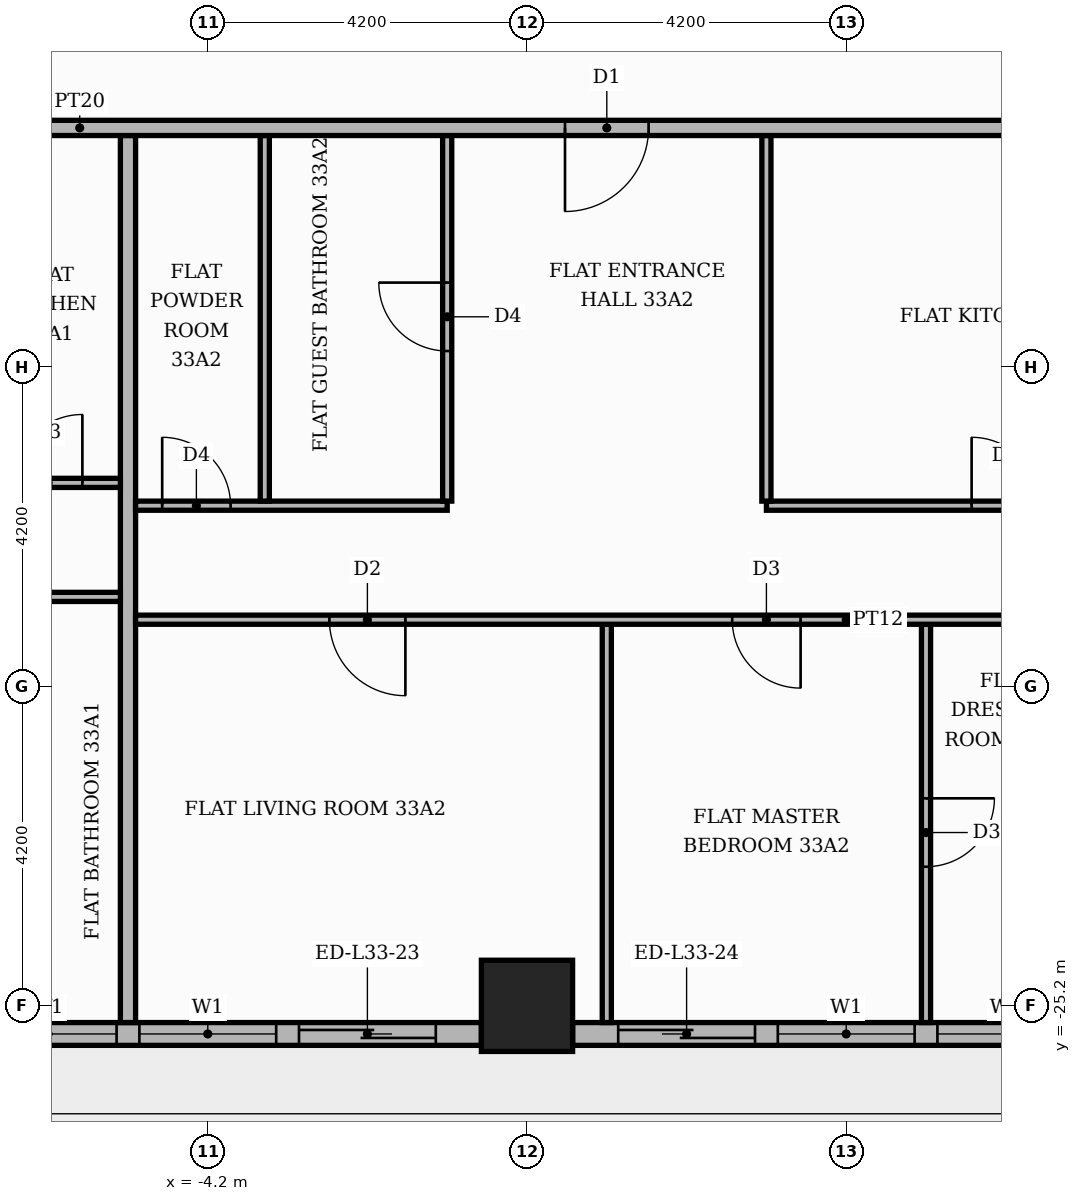
"""IFC4 building model, lengths in metres.
Left out: names, types, materials, properties, quantities, classifications, styles, units other than length and angle.
Written with IfcOpenShell. Run it as: python <this file> out.ifc"""

import sys

from ifc_helpers import new_model, si_unit, direction, frame, frame_2d, origin, origin_2d, place, context, subcontext, project, spatial, rectangle, extrude, element, fill, save


model = new_model("IFC4")
c1 = context("Model", 3, precision=1e-05, world=origin(), true_north=direction((0.0, 1.0)))
c2 = subcontext(c1, "Body", "Model", "MODEL_VIEW")
j1 = project(units=[si_unit("LENGTHUNIT", "METRE"), si_unit("PLANEANGLEUNIT", "RADIAN")], contexts=[c1])
p1 = place(None, origin())
s1 = spatial("IfcSite", under=j1, at=p1, CompositionType="ELEMENT")
p2 = place(p1, origin())
s2 = spatial("IfcBuilding", under=s1, at=p2, CompositionType="ELEMENT")
p3 = place(p2, frame((0.0, 0.0, 141.6)))
s3 = spatial("IfcBuildingStorey", under=s2, at=p3, CompositionType="ELEMENT", Elevation=141.6)
p4 = place(p3, frame((0.0, -25.2, 0.0), z_axis=(0.0, 0.0, 1.0), x_axis=(1.0, 0.0, 0.0)))
e1 = element("IfcColumn", 1, at=p4, inside=s3, PredefinedType="COLUMN", context=c2, shape_type="SweptSolid", body=[
    extrude(rectangle(XDim=1.2, YDim=1.2, at=origin_2d()), origin(), (0.0, 0.0, 1.0), 3.9),
])
p5 = place(p3, frame((-7.8, -25.57, 0.0), z_axis=(0.0, 0.0, 1.0), x_axis=(1.0, 0.0, 0.0)))
e2 = element("IfcWall", 2, at=p5, inside=s3, PredefinedType="STANDARD", context=c2, shape_type="SweptSolid", body=[
    extrude(rectangle(XDim=7.2, YDim=0.3, at=frame_2d((3.6, 0.0))), origin(), (0.0, 0.0, 1.0), 3.48),
])
p6 = place(p5, frame((0.6, 0.0, 0.9)))
e3 = element("IfcOpeningElement", 3, at=p6, cuts=e2, PredefinedType="OPENING", context=c2, shape_type="SweptSolid", body=[
    extrude(rectangle(XDim=1.8, YDim=2.1, at=frame_2d((0.9, 1.05))), frame((0.0, 0.16, 0.0), z_axis=(0.0, -1.0, 0.0), x_axis=(1.0, 0.0, 0.0)), (0.0, 0.0, 1.0), 0.32),
])
p7 = place(p5, frame((2.7, 0.0, 0.9)))
e4 = element("IfcOpeningElement", 4, at=p7, cuts=e2, PredefinedType="OPENING", context=c2, shape_type="SweptSolid", body=[
    extrude(rectangle(XDim=1.8, YDim=2.1, at=frame_2d((0.9, 1.05))), frame((0.0, 0.16, 0.0), z_axis=(0.0, -1.0, 0.0), x_axis=(1.0, 0.0, 0.0)), (0.0, 0.0, 1.0), 0.32),
])
p8 = place(p5, frame((4.8, 0.0, 0.0)))
e5 = element("IfcOpeningElement", 5, at=p8, cuts=e2, PredefinedType="OPENING", context=c2, shape_type="SweptSolid", body=[
    extrude(rectangle(XDim=1.8, YDim=2.4, at=frame_2d((0.9, 1.2))), frame((0.0, 0.16, 0.0), z_axis=(0.0, -1.0, 0.0), x_axis=(1.0, 0.0, 0.0)), (0.0, 0.0, 1.0), 0.32),
])
p9 = place(p3, frame((0.6, -25.57, 0.0), z_axis=(0.0, 0.0, 1.0), x_axis=(1.0, 0.0, 0.0)))
e6 = element("IfcWall", 6, at=p9, inside=s3, PredefinedType="STANDARD", context=c2, shape_type="SweptSolid", body=[
    extrude(rectangle(XDim=7.2, YDim=0.3, at=frame_2d((3.6, 0.0))), origin(), (0.0, 0.0, 1.0), 3.48),
])
p10 = place(p9, frame((0.6, 0.0, 0.0)))
e7 = element("IfcOpeningElement", 7, at=p10, cuts=e6, PredefinedType="OPENING", context=c2, shape_type="SweptSolid", body=[
    extrude(rectangle(XDim=1.8, YDim=2.4, at=frame_2d((0.9, 1.2))), frame((0.0, 0.16, 0.0), z_axis=(0.0, -1.0, 0.0), x_axis=(1.0, 0.0, 0.0)), (0.0, 0.0, 1.0), 0.32),
])
p11 = place(p9, frame((2.7, 0.0, 0.9)))
e8 = element("IfcOpeningElement", 8, at=p11, cuts=e6, PredefinedType="OPENING", context=c2, shape_type="SweptSolid", body=[
    extrude(rectangle(XDim=1.8, YDim=2.1, at=frame_2d((0.9, 1.05))), frame((0.0, 0.16, 0.0), z_axis=(0.0, -1.0, 0.0), x_axis=(1.0, 0.0, 0.0)), (0.0, 0.0, 1.0), 0.32),
])
p12 = place(p9, frame((4.8, 0.0, 0.9)))
e9 = element("IfcOpeningElement", 9, at=p12, cuts=e6, PredefinedType="OPENING", context=c2, shape_type="SweptSolid", body=[
    extrude(rectangle(XDim=1.8, YDim=2.1, at=frame_2d((0.9, 1.05))), frame((0.0, 0.16, 0.0), z_axis=(0.0, -1.0, 0.0), x_axis=(1.0, 0.0, 0.0)), (0.0, 0.0, 1.0), 0.32),
])
p13 = place(p3, frame((-5.25, -25.42, 0.0), z_axis=(0.0, 0.0, 1.0), x_axis=(0.0, 1.0, 0.0)))
e10 = element("IfcWall", 10, at=p13, inside=s3, PredefinedType="PARTITIONING", context=c2, shape_type="SweptSolid", body=[
    extrude(rectangle(XDim=11.67, YDim=0.2, at=frame_2d((5.835, 0.0))), origin(), (0.0, 0.0, 1.0), 3.48),
])
p14 = place(p3, frame((1.05, -25.42, 0.0), z_axis=(0.0, 0.0, 1.0), x_axis=(0.0, 1.0, 0.0)))
e11 = element("IfcWall", 11, at=p14, inside=s3, PredefinedType="PARTITIONING", context=c2, shape_type="SweptSolid", body=[
    extrude(rectangle(XDim=5.24, YDim=0.12, at=frame_2d((2.62, 0.0))), origin(), (0.0, 0.0, 1.0), 3.48),
])
p15 = place(p3, frame((5.25, -25.42, 0.0), z_axis=(0.0, 0.0, 1.0), x_axis=(0.0, 1.0, 0.0)))
e12 = element("IfcWall", 12, at=p15, inside=s3, PredefinedType="PARTITIONING", context=c2, shape_type="SweptSolid", body=[
    extrude(rectangle(XDim=5.24, YDim=0.12, at=frame_2d((2.62, 0.0))), origin(), (0.0, 0.0, 1.0), 3.48),
])
p16 = place(p15, frame((2.05, 0.0, 0.0)))
e13 = element("IfcOpeningElement", 13, at=p16, cuts=e12, PredefinedType="OPENING", context=c2, shape_type="SweptSolid", body=[
    extrude(rectangle(XDim=0.9, YDim=2.1, at=frame_2d((0.45, 1.05))), frame((0.0, 0.07, 0.0), z_axis=(0.0, -1.0, 0.0), x_axis=(1.0, 0.0, 0.0)), (0.0, 0.0, 1.0), 0.14),
])
p17 = place(p3, frame((-5.15, -20.12, 0.0), z_axis=(0.0, 0.0, 1.0), x_axis=(1.0, 0.0, 0.0)))
e14 = element("IfcWall", 14, at=p17, inside=s3, PredefinedType="PARTITIONING", context=c2, shape_type="SweptSolid", body=[
    extrude(rectangle(XDim=18.7, YDim=0.12, at=frame_2d((9.35, 0.0))), origin(), (0.0, 0.0, 1.0), 3.48),
])
p18 = place(p17, frame((2.55, 0.0, 0.0)))
e15 = element("IfcOpeningElement", 15, at=p18, cuts=e14, PredefinedType="OPENING", context=c2, shape_type="SweptSolid", body=[
    extrude(rectangle(XDim=1.0, YDim=2.1, at=frame_2d((0.5, 1.05))), frame((0.0, 0.07, 0.0), z_axis=(0.0, -1.0, 0.0), x_axis=(1.0, 0.0, 0.0)), (0.0, 0.0, 1.0), 0.14),
])
p19 = place(p17, frame((7.85, 0.0, 0.0)))
e16 = element("IfcOpeningElement", 16, at=p19, cuts=e14, PredefinedType="OPENING", context=c2, shape_type="SweptSolid", body=[
    extrude(rectangle(XDim=0.9, YDim=2.1, at=frame_2d((0.45, 1.05))), frame((0.0, 0.07, 0.0), z_axis=(0.0, -1.0, 0.0), x_axis=(1.0, 0.0, 0.0)), (0.0, 0.0, 1.0), 0.14),
])
p20 = place(p17, frame((16.25, 0.0, 0.0)))
e17 = element("IfcOpeningElement", 17, at=p20, cuts=e14, PredefinedType="OPENING", context=c2, shape_type="SweptSolid", body=[
    extrude(rectangle(XDim=0.9, YDim=2.1, at=frame_2d((0.45, 1.05))), frame((0.0, 0.07, 0.0), z_axis=(0.0, -1.0, 0.0), x_axis=(1.0, 0.0, 0.0)), (0.0, 0.0, 1.0), 0.14),
])
p21 = place(p3, frame((-17.5, -19.82, 0.0), z_axis=(0.0, 0.0, 1.0), x_axis=(1.0, 0.0, 0.0)))
e18 = element("IfcWall", 18, at=p21, inside=s3, PredefinedType="PARTITIONING", context=c2, shape_type="SweptSolid", body=[
    extrude(rectangle(XDim=12.15, YDim=0.12, at=frame_2d((6.075, 0.0))), origin(), (0.0, 0.0, 1.0), 3.48),
])
p22 = place(p21, frame((2.3, 0.0, 0.0)))
e19 = element("IfcOpeningElement", 19, at=p22, cuts=e18, PredefinedType="OPENING", context=c2, shape_type="SweptSolid", body=[
    extrude(rectangle(XDim=1.0, YDim=2.1, at=frame_2d((0.5, 1.05))), frame((0.0, 0.07, 0.0), z_axis=(0.0, -1.0, 0.0), x_axis=(1.0, 0.0, 0.0)), (0.0, 0.0, 1.0), 0.14),
])
p23 = place(p21, frame((5.5, 0.0, 0.0)))
e20 = element("IfcOpeningElement", 20, at=p23, cuts=e18, PredefinedType="OPENING", context=c2, shape_type="SweptSolid", body=[
    extrude(rectangle(XDim=0.9, YDim=2.1, at=frame_2d((0.45, 1.05))), frame((0.0, 0.07, 0.0), z_axis=(0.0, -1.0, 0.0), x_axis=(1.0, 0.0, 0.0)), (0.0, 0.0, 1.0), 0.14),
])
p24 = place(p3, frame((-5.15, -18.62, 0.0), z_axis=(0.0, 0.0, 1.0), x_axis=(1.0, 0.0, 0.0)))
e21 = element("IfcWall", 21, at=p24, inside=s3, PredefinedType="PARTITIONING", context=c2, shape_type="SweptSolid", body=[
    extrude(rectangle(XDim=4.1, YDim=0.12, at=frame_2d((2.05, 0.0))), origin(), (0.0, 0.0, 1.0), 3.48),
])
p25 = place(p24, frame((0.35, 0.0, 0.0)))
e22 = element("IfcOpeningElement", 22, at=p25, cuts=e21, PredefinedType="OPENING", context=c2, shape_type="SweptSolid", body=[
    extrude(rectangle(XDim=0.9, YDim=2.1, at=frame_2d((0.45, 1.05))), frame((0.0, 0.07, 0.0), z_axis=(0.0, -1.0, 0.0), x_axis=(1.0, 0.0, 0.0)), (0.0, 0.0, 1.0), 0.14),
])
p26 = place(p3, frame((3.15, -18.62, 0.0), z_axis=(0.0, 0.0, 1.0), x_axis=(1.0, 0.0, 0.0)))
e23 = element("IfcWall", 23, at=p26, inside=s3, PredefinedType="PARTITIONING", context=c2, shape_type="SweptSolid", body=[
    extrude(rectangle(XDim=10.4, YDim=0.12, at=frame_2d((5.2, 0.0))), origin(), (0.0, 0.0, 1.0), 3.48),
])
p27 = place(p26, frame((2.7, 0.0, 0.0)))
e24 = element("IfcOpeningElement", 24, at=p27, cuts=e23, PredefinedType="OPENING", context=c2, shape_type="SweptSolid", body=[
    extrude(rectangle(XDim=0.9, YDim=2.1, at=frame_2d((0.45, 1.05))), frame((0.0, 0.07, 0.0), z_axis=(0.0, -1.0, 0.0), x_axis=(1.0, 0.0, 0.0)), (0.0, 0.0, 1.0), 0.14),
])
p28 = place(p26, frame((6.9, 0.0, 0.0)))
e25 = element("IfcOpeningElement", 25, at=p28, cuts=e23, PredefinedType="OPENING", context=c2, shape_type="SweptSolid", body=[
    extrude(rectangle(XDim=0.9, YDim=2.1, at=frame_2d((0.45, 1.05))), frame((0.0, 0.07, 0.0), z_axis=(0.0, -1.0, 0.0), x_axis=(1.0, 0.0, 0.0)), (0.0, 0.0, 1.0), 0.14),
])
p29 = place(p26, frame((9.0, 0.0, 0.0)))
e26 = element("IfcOpeningElement", 26, at=p29, cuts=e23, PredefinedType="OPENING", context=c2, shape_type="SweptSolid", body=[
    extrude(rectangle(XDim=0.9, YDim=2.1, at=frame_2d((0.45, 1.05))), frame((0.0, 0.07, 0.0), z_axis=(0.0, -1.0, 0.0), x_axis=(1.0, 0.0, 0.0)), (0.0, 0.0, 1.0), 0.14),
])
p30 = place(p3, frame((-3.45, -18.56, 0.0), z_axis=(0.0, 0.0, 1.0), x_axis=(0.0, 1.0, 0.0)))
e27 = element("IfcWall", 27, at=p30, inside=s3, PredefinedType="PARTITIONING", context=c2, shape_type="SweptSolid", body=[
    extrude(rectangle(XDim=4.81, YDim=0.12, at=frame_2d((2.405, 0.0))), origin(), (0.0, 0.0, 1.0), 3.48),
])
p31 = place(p3, frame((-1.05, -18.56, 0.0), z_axis=(0.0, 0.0, 1.0), x_axis=(0.0, 1.0, 0.0)))
e28 = element("IfcWall", 28, at=p31, inside=s3, PredefinedType="PARTITIONING", context=c2, shape_type="SweptSolid", body=[
    extrude(rectangle(XDim=4.81, YDim=0.12, at=frame_2d((2.405, 0.0))), origin(), (0.0, 0.0, 1.0), 3.48),
])
p32 = place(p31, frame((1.975, 0.0, 0.0)))
e29 = element("IfcOpeningElement", 29, at=p32, cuts=e28, PredefinedType="OPENING", context=c2, shape_type="SweptSolid", body=[
    extrude(rectangle(XDim=0.9, YDim=2.1, at=frame_2d((0.45, 1.05))), frame((0.0, 0.07, 0.0), z_axis=(0.0, -1.0, 0.0), x_axis=(1.0, 0.0, 0.0)), (0.0, 0.0, 1.0), 0.14),
])
p33 = place(p3, frame((3.15, -18.56, 0.0), z_axis=(0.0, 0.0, 1.0), x_axis=(0.0, 1.0, 0.0)))
e30 = element("IfcWall", 30, at=p33, inside=s3, PredefinedType="PARTITIONING", context=c2, shape_type="SweptSolid", body=[
    extrude(rectangle(XDim=4.81, YDim=0.12, at=frame_2d((2.405, 0.0))), origin(), (0.0, 0.0, 1.0), 3.48),
])
p34 = place(p3, frame((-9.45, -18.32, 0.0), z_axis=(0.0, 0.0, 1.0), x_axis=(1.0, 0.0, 0.0)))
e31 = element("IfcWall", 31, at=p34, inside=s3, PredefinedType="PARTITIONING", context=c2, shape_type="SweptSolid", body=[
    extrude(rectangle(XDim=4.1, YDim=0.12, at=frame_2d((2.05, 0.0))), origin(), (0.0, 0.0, 1.0), 3.48),
])
p35 = place(p34, frame((2.7, 0.0, 0.0)))
e32 = element("IfcOpeningElement", 32, at=p35, cuts=e31, PredefinedType="OPENING", context=c2, shape_type="SweptSolid", body=[
    extrude(rectangle(XDim=0.9, YDim=2.1, at=frame_2d((0.45, 1.05))), frame((0.0, 0.07, 0.0), z_axis=(0.0, -1.0, 0.0), x_axis=(1.0, 0.0, 0.0)), (0.0, 0.0, 1.0), 0.14),
])
p36 = place(p3, frame((-25.42, -13.65, 0.0), z_axis=(0.0, 0.0, 1.0), x_axis=(1.0, 0.0, 0.0)))
e33 = element("IfcWall", 33, at=p36, inside=s3, PredefinedType="PARTITIONING", context=c2, shape_type="SweptSolid", body=[
    extrude(rectangle(XDim=39.07, YDim=0.2, at=frame_2d((19.535, 0.0))), origin(), (0.0, 0.0, 1.0), 3.48),
])
p37 = place(p36, frame((13.32, 0.0, 0.0)))
e34 = element("IfcOpeningElement", 34, at=p37, cuts=e33, PredefinedType="OPENING", context=c2, shape_type="SweptSolid", body=[
    extrude(rectangle(XDim=1.1, YDim=2.4, at=frame_2d((0.55, 1.2))), frame((0.0, 0.11, 0.0), z_axis=(0.0, -1.0, 0.0), x_axis=(1.0, 0.0, 0.0)), (0.0, 0.0, 1.0), 0.22),
])
p38 = place(p36, frame((25.92, 0.0, 0.0)))
e35 = element("IfcOpeningElement", 35, at=p38, cuts=e33, PredefinedType="OPENING", context=c2, shape_type="SweptSolid", body=[
    extrude(rectangle(XDim=1.1, YDim=2.4, at=frame_2d((0.55, 1.2))), frame((0.0, 0.11, 0.0), z_axis=(0.0, -1.0, 0.0), x_axis=(1.0, 0.0, 0.0)), (0.0, 0.0, 1.0), 0.22),
])
p39 = place(p6, origin())
e36 = element("IfcWindow", 36, at=p39, inside=s3, PartitioningType="SINGLE_PANEL", PredefinedType="WINDOW", context=c2, shape_type="SweptSolid", body=[
    extrude(rectangle(XDim=1.8, YDim=2.1, at=frame_2d((0.9, 1.05))), frame((0.0, 0.03, 0.0), z_axis=(0.0, -1.0, 0.0), x_axis=(1.0, 0.0, 0.0)), (0.0, 0.0, 1.0), 0.06),
])
fill(e3, e36)
p40 = place(p7, origin())
e37 = element("IfcWindow", 37, at=p40, inside=s3, PartitioningType="SINGLE_PANEL", PredefinedType="WINDOW", context=c2, shape_type="SweptSolid", body=[
    extrude(rectangle(XDim=1.8, YDim=2.1, at=frame_2d((0.9, 1.05))), frame((0.0, 0.03, 0.0), z_axis=(0.0, -1.0, 0.0), x_axis=(1.0, 0.0, 0.0)), (0.0, 0.0, 1.0), 0.06),
])
fill(e4, e37)
p41 = place(p8, origin())
e38 = element("IfcDoor", 38, at=p41, inside=s3, OperationType="SLIDING_TO_RIGHT", PredefinedType="DOOR", context=c2, shape_type="SweptSolid", body=[
    extrude(rectangle(XDim=1.8, YDim=2.4, at=frame_2d((0.9, 1.2))), frame((0.0, 0.025, 0.0), z_axis=(0.0, -1.0, 0.0), x_axis=(1.0, 0.0, 0.0)), (0.0, 0.0, 1.0), 0.05),
])
fill(e5, e38)
p42 = place(p10, origin())
e39 = element("IfcDoor", 39, at=p42, inside=s3, OperationType="SLIDING_TO_LEFT", PredefinedType="DOOR", context=c2, shape_type="SweptSolid", body=[
    extrude(rectangle(XDim=1.8, YDim=2.4, at=frame_2d((0.9, 1.2))), frame((0.0, 0.025, 0.0), z_axis=(0.0, -1.0, 0.0), x_axis=(1.0, 0.0, 0.0)), (0.0, 0.0, 1.0), 0.05),
])
fill(e7, e39)
p43 = place(p11, origin())
e40 = element("IfcWindow", 40, at=p43, inside=s3, PartitioningType="SINGLE_PANEL", PredefinedType="WINDOW", context=c2, shape_type="SweptSolid", body=[
    extrude(rectangle(XDim=1.8, YDim=2.1, at=frame_2d((0.9, 1.05))), frame((0.0, 0.03, 0.0), z_axis=(0.0, -1.0, 0.0), x_axis=(1.0, 0.0, 0.0)), (0.0, 0.0, 1.0), 0.06),
])
fill(e8, e40)
p44 = place(p12, origin())
e41 = element("IfcWindow", 41, at=p44, inside=s3, PartitioningType="SINGLE_PANEL", PredefinedType="WINDOW", context=c2, shape_type="SweptSolid", body=[
    extrude(rectangle(XDim=1.8, YDim=2.1, at=frame_2d((0.9, 1.05))), frame((0.0, 0.03, 0.0), z_axis=(0.0, -1.0, 0.0), x_axis=(1.0, 0.0, 0.0)), (0.0, 0.0, 1.0), 0.06),
])
fill(e9, e41)
p45 = place(p35, origin())
e42 = element("IfcDoor", 42, at=p45, inside=s3, OperationType="SINGLE_SWING_RIGHT", PredefinedType="DOOR", context=c2, shape_type="SweptSolid", body=[
    extrude(rectangle(XDim=0.9, YDim=2.1, at=frame_2d((0.45, 1.05))), frame((0.0, 0.025, 0.0), z_axis=(0.0, -1.0, 0.0), x_axis=(1.0, 0.0, 0.0)), (0.0, 0.0, 1.0), 0.05),
])
fill(e32, e42)
p46 = place(p38, frame((1.1, 0.0, 0.0), z_axis=(0.0, 0.0, 1.0), x_axis=(-1.0, 0.0, 0.0)))
e43 = element("IfcDoor", 43, at=p46, inside=s3, OperationType="SINGLE_SWING_LEFT", PredefinedType="DOOR", context=c2, shape_type="SweptSolid", body=[
    extrude(rectangle(XDim=1.1, YDim=2.4, at=frame_2d((0.55, 1.2))), frame((0.0, 0.025, 0.0), z_axis=(0.0, -1.0, 0.0), x_axis=(1.0, 0.0, 0.0)), (0.0, 0.0, 1.0), 0.05),
])
fill(e35, e43)
p47 = place(p25, origin())
e44 = element("IfcDoor", 44, at=p47, inside=s3, OperationType="SINGLE_SWING_LEFT", PredefinedType="DOOR", context=c2, shape_type="SweptSolid", body=[
    extrude(rectangle(XDim=0.9, YDim=2.1, at=frame_2d((0.45, 1.05))), frame((0.0, 0.025, 0.0), z_axis=(0.0, -1.0, 0.0), x_axis=(1.0, 0.0, 0.0)), (0.0, 0.0, 1.0), 0.05),
])
fill(e22, e44)
p48 = place(p32, origin())
e45 = element("IfcDoor", 45, at=p48, inside=s3, OperationType="SINGLE_SWING_RIGHT", PredefinedType="DOOR", context=c2, shape_type="SweptSolid", body=[
    extrude(rectangle(XDim=0.9, YDim=2.1, at=frame_2d((0.45, 1.05))), frame((0.0, 0.025, 0.0), z_axis=(0.0, -1.0, 0.0), x_axis=(1.0, 0.0, 0.0)), (0.0, 0.0, 1.0), 0.05),
])
fill(e29, e45)
p49 = place(p27, origin())
e46 = element("IfcDoor", 46, at=p49, inside=s3, OperationType="SINGLE_SWING_LEFT", PredefinedType="DOOR", context=c2, shape_type="SweptSolid", body=[
    extrude(rectangle(XDim=0.9, YDim=2.1, at=frame_2d((0.45, 1.05))), frame((0.0, 0.025, 0.0), z_axis=(0.0, -1.0, 0.0), x_axis=(1.0, 0.0, 0.0)), (0.0, 0.0, 1.0), 0.05),
])
fill(e24, e46)
p50 = place(p18, frame((1.0, 0.0, 0.0), z_axis=(0.0, 0.0, 1.0), x_axis=(-1.0, 0.0, 0.0)))
e47 = element("IfcDoor", 47, at=p50, inside=s3, OperationType="SINGLE_SWING_RIGHT", PredefinedType="DOOR", context=c2, shape_type="SweptSolid", body=[
    extrude(rectangle(XDim=1.0, YDim=2.1, at=frame_2d((0.5, 1.05))), frame((0.0, 0.025, 0.0), z_axis=(0.0, -1.0, 0.0), x_axis=(1.0, 0.0, 0.0)), (0.0, 0.0, 1.0), 0.05),
])
fill(e15, e47)
p51 = place(p19, frame((0.9, 0.0, 0.0), z_axis=(0.0, 0.0, 1.0), x_axis=(-1.0, 0.0, 0.0)))
e48 = element("IfcDoor", 48, at=p51, inside=s3, OperationType="SINGLE_SWING_RIGHT", PredefinedType="DOOR", context=c2, shape_type="SweptSolid", body=[
    extrude(rectangle(XDim=0.9, YDim=2.1, at=frame_2d((0.45, 1.05))), frame((0.0, 0.025, 0.0), z_axis=(0.0, -1.0, 0.0), x_axis=(1.0, 0.0, 0.0)), (0.0, 0.0, 1.0), 0.05),
])
fill(e16, e48)
p52 = place(p16, frame((0.9, 0.0, 0.0), z_axis=(0.0, 0.0, 1.0), x_axis=(-1.0, 0.0, 0.0)))
e49 = element("IfcDoor", 49, at=p52, inside=s3, OperationType="SINGLE_SWING_RIGHT", PredefinedType="DOOR", context=c2, shape_type="SweptSolid", body=[
    extrude(rectangle(XDim=0.9, YDim=2.1, at=frame_2d((0.45, 1.05))), frame((0.0, 0.025, 0.0), z_axis=(0.0, -1.0, 0.0), x_axis=(1.0, 0.0, 0.0)), (0.0, 0.0, 1.0), 0.05),
])
fill(e13, e49)
save(model, sys.argv[1])
